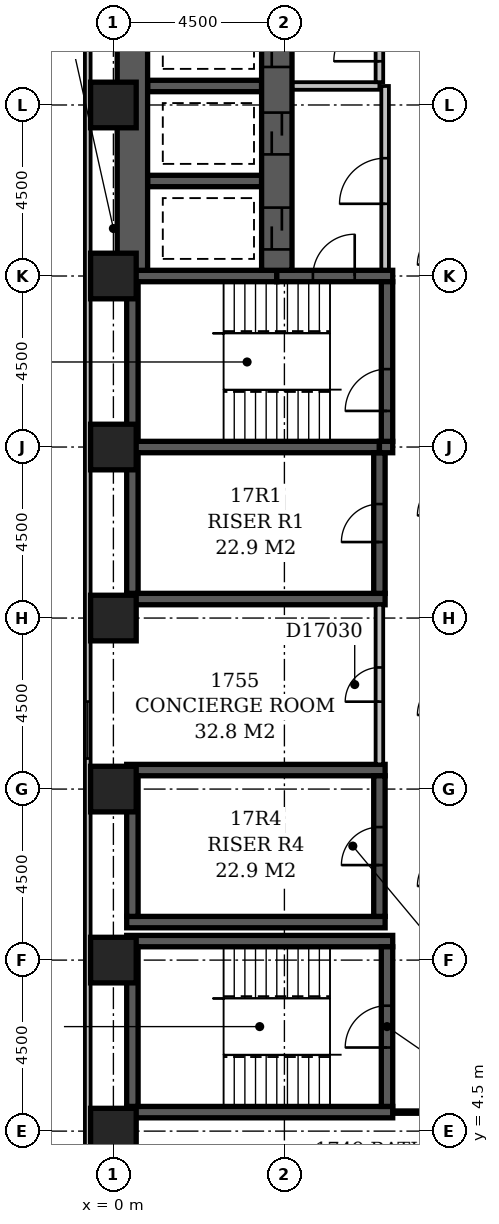
"""IFC4 building model, lengths in metres.
Left out: names, types, materials, properties, quantities, classifications, styles, units other than length and angle.
Written with IfcOpenShell. Run it as: python <this file> out.ifc"""

import sys

from ifc_helpers import new_model, si_unit, direction, frame, frame_2d, origin, origin_2d, place, context, subcontext, project, spatial, rectangle, extrude, element, fill, save


model = new_model("IFC4")
c1 = context("Model", 3, precision=1e-05, world=origin(), true_north=direction((0.0, 1.0)))
c2 = subcontext(c1, "Body", "Model", "MODEL_VIEW")
j1 = project(units=[si_unit("LENGTHUNIT", "METRE"), si_unit("PLANEANGLEUNIT", "RADIAN")], contexts=[c1])
p1 = place(None, origin())
s1 = spatial("IfcSite", under=j1, at=p1, CompositionType="ELEMENT")
p2 = place(p1, origin())
s2 = spatial("IfcBuilding", under=s1, at=p2, CompositionType="ELEMENT")
p3 = place(p2, frame((0.0, 0.0, 72.2)))
s3 = spatial("IfcBuildingStorey", under=s2, at=p3, CompositionType="ELEMENT", Elevation=72.2)
for number, where, z_axis, x_axis in (
    (1, (0.35, 5.0, -0.3), (0.0, 0.0, 1.0), (1.0, 0.0, 0.0)),
    (2, (0.35, 9.5, -0.3), (0.0, 0.0, 1.0), (1.0, 0.0, 0.0)),
):
    element("IfcWall", number, at=place(p3, frame(where, z_axis=z_axis, x_axis=x_axis)), inside=s3, PredefinedType="SHEAR", context=c2, shape_type="SweptSolid", body=[
        extrude(rectangle(XDim=7.0, YDim=0.3, at=frame_2d((3.5, 0.0))), origin(), (0.0, 0.0, 1.0), 3.6),
    ])
for number, where, z_axis, x_axis in (
    (3, (0.35, 10.0, -0.3), (0.0, 0.0, 1.0), (1.0, 0.0, 0.0)),
    (4, (0.35, 14.0, -0.3), (0.0, 0.0, 1.0), (1.0, 0.0, 0.0)),
    (5, (0.35, 18.5, -0.3), (0.0, 0.0, 1.0), (1.0, 0.0, 0.0)),
):
    element("IfcWall", number, at=place(p3, frame(where, z_axis=z_axis, x_axis=x_axis)), inside=s3, PredefinedType="SHEAR", context=c2, shape_type="SweptSolid", body=[
        extrude(rectangle(XDim=6.8, YDim=0.3, at=frame_2d((3.4, 0.0))), origin(), (0.0, 0.0, 1.0), 3.6),
    ])
p4 = place(p3, frame((0.35, 22.5, -0.3), z_axis=(0.0, 0.0, 1.0), x_axis=(1.0, 0.0, 0.0)))
e6 = element("IfcWall", 6, at=p4, inside=s3, PredefinedType="SHEAR", context=c2, shape_type="SweptSolid", body=[
    extrude(rectangle(XDim=6.65, YDim=0.3, at=frame_2d((3.325, 0.0))), origin(), (0.0, 0.0, 1.0), 3.6),
])
p5 = place(p3, frame((0.35, 27.0, -0.3), z_axis=(0.0, 0.0, 1.0), x_axis=(1.0, 0.0, 0.0)))
e7 = element("IfcWall", 7, at=p5, inside=s3, PredefinedType="SHEAR", context=c2, shape_type="SweptSolid", body=[
    extrude(rectangle(XDim=3.95, YDim=0.3, at=frame_2d((1.975, 0.0))), origin(), (0.0, 0.0, 1.0), 3.6),
])
p6 = place(p3, frame((0.5, 5.15, -0.3), z_axis=(0.0, 0.0, 1.0), x_axis=(0.0, 1.0, 0.0)))
e8 = element("IfcWall", 8, at=p6, inside=s3, PredefinedType="SHEAR", context=c2, shape_type="SweptSolid", body=[
    extrude(rectangle(XDim=4.2, YDim=0.3, at=frame_2d((2.1, 0.0))), origin(), (0.0, 0.0, 1.0), 3.6),
])
for number, where, z_axis, x_axis in (
    (9, (0.5, 10.15, -0.3), (0.0, 0.0, 1.0), (0.0, 1.0, 0.0)),
    (10, (0.5, 18.65, -0.3), (0.0, 0.0, 1.0), (0.0, 1.0, 0.0)),
):
    element("IfcWall", number, at=place(p3, frame(where, z_axis=z_axis, x_axis=x_axis)), inside=s3, PredefinedType="SHEAR", context=c2, shape_type="SweptSolid", body=[
        extrude(rectangle(XDim=3.7, YDim=0.3, at=frame_2d((1.85, 0.0))), origin(), (0.0, 0.0, 1.0), 3.6),
    ])
p7 = place(p3, frame((0.5, 22.65, -0.3), z_axis=(0.0, 0.0, 1.0), x_axis=(0.0, 1.0, 0.0)))
e11 = element("IfcWall", 11, at=p7, inside=s3, PredefinedType="SHEAR", context=c2, shape_type="SweptSolid", body=[
    extrude(rectangle(XDim=4.2, YDim=0.3, at=frame_2d((2.1, 0.0))), origin(), (0.0, 0.0, 1.0), 3.6),
])
p8 = place(p3, frame((0.5, 27.15, -0.3), z_axis=(0.0, 0.0, 1.0), x_axis=(0.0, 1.0, 0.0)))
e12 = element("IfcWall", 12, at=p8, inside=s3, PredefinedType="SHEAR", context=c2, shape_type="SweptSolid", body=[
    extrude(rectangle(XDim=6.95, YDim=0.8, at=frame_2d((3.475, 0.0))), origin(), (0.0, 0.0, 1.0), 3.6),
])
for number, where, z_axis, x_axis in (
    (13, (0.9, 29.5, -0.3), (0.0, 0.0, 1.0), (1.0, 0.0, 0.0)),
    (14, (0.9, 32.0, -0.3), (0.0, 0.0, 1.0), (1.0, 0.0, 0.0)),
):
    element("IfcWall", number, at=place(p3, frame(where, z_axis=z_axis, x_axis=x_axis)), inside=s3, PredefinedType="SHEAR", context=c2, shape_type="SweptSolid", body=[
        extrude(rectangle(XDim=3.0, YDim=0.3, at=frame_2d((1.5, 0.0))), origin(), (0.0, 0.0, 1.0), 3.6),
    ])
p9 = place(p3, frame((4.3, 27.0, -0.3), z_axis=(0.0, 0.0, 1.0), x_axis=(1.0, 0.0, 0.0)))
e15 = element("IfcWall", 15, at=p9, inside=s3, PredefinedType="SHEAR", context=c2, shape_type="SweptSolid", body=[
    extrude(rectangle(XDim=3.05, YDim=0.3, at=frame_2d((1.525, 0.0))), origin(), (0.0, 0.0, 1.0), 3.6),
])
p10 = place(p9, frame((0.95, 0.0, 0.3)))
e16 = element("IfcOpeningElement", 16, at=p10, cuts=e15, PredefinedType="OPENING", context=c2, shape_type="SweptSolid", body=[
    extrude(rectangle(XDim=1.1, YDim=2.1, at=frame_2d((0.55, 1.05))), frame((0.0, 0.162, 0.0), z_axis=(0.0, -1.0, 0.0), x_axis=(1.0, 0.0, 0.0)), (0.0, 0.0, 1.0), 0.324),
])
p11 = place(p3, frame((4.3, 27.15, -0.3), z_axis=(0.0, 0.0, 1.0), x_axis=(0.0, 1.0, 0.0)))
e17 = element("IfcWall", 17, at=p11, inside=s3, PredefinedType="SHEAR", context=c2, shape_type="SweptSolid", body=[
    extrude(rectangle(XDim=6.95, YDim=0.8, at=frame_2d((3.475, 0.0))), origin(), (0.0, 0.0, 1.0), 3.6),
])
p12 = place(p11, frame((3.05, 0.0, 0.3)))
e18 = element("IfcOpeningElement", 18, at=p12, cuts=e17, PredefinedType="OPENING", context=c2, shape_type="SweptSolid", body=[
    extrude(rectangle(XDim=1.1, YDim=2.1, at=frame_2d((0.55, 1.05))), frame((0.0, 0.412, 0.0), z_axis=(0.0, -1.0, 0.0), x_axis=(1.0, 0.0, 0.0)), (0.0, 0.0, 1.0), 0.824),
])
p13 = place(p11, frame((0.55, 0.0, 0.3)))
e19 = element("IfcOpeningElement", 19, at=p13, cuts=e17, PredefinedType="OPENING", context=c2, shape_type="SweptSolid", body=[
    extrude(rectangle(XDim=1.1, YDim=2.1, at=frame_2d((0.55, 1.05))), frame((0.0, 0.412, 0.0), z_axis=(0.0, -1.0, 0.0), x_axis=(1.0, 0.0, 0.0)), (0.0, 0.0, 1.0), 0.824),
])
p14 = place(p11, frame((5.35, 0.0, 0.3)))
e20 = element("IfcOpeningElement", 20, at=p14, cuts=e17, PredefinedType="OPENING", context=c2, shape_type="SweptSolid", body=[
    extrude(rectangle(XDim=1.1, YDim=2.1, at=frame_2d((0.55, 1.05))), frame((0.0, 0.412, 0.0), z_axis=(0.0, -1.0, 0.0), x_axis=(1.0, 0.0, 0.0)), (0.0, 0.0, 1.0), 0.824),
])
p15 = place(p3, frame((7.0, 10.15, -0.3), z_axis=(0.0, 0.0, 1.0), x_axis=(0.0, 1.0, 0.0)))
e21 = element("IfcWall", 21, at=p15, inside=s3, PredefinedType="SHEAR", context=c2, shape_type="SweptSolid", body=[
    extrude(rectangle(XDim=3.7, YDim=0.3, at=frame_2d((1.85, 0.0))), origin(), (0.0, 0.0, 1.0), 3.6),
])
p16 = place(p15, frame((1.35, 0.0, 0.3)))
e22 = element("IfcOpeningElement", 22, at=p16, cuts=e21, PredefinedType="OPENING", context=c2, shape_type="SweptSolid", body=[
    extrude(rectangle(XDim=1.0, YDim=2.1, at=frame_2d((0.5, 1.05))), frame((0.0, 0.162, 0.0), z_axis=(0.0, -1.0, 0.0), x_axis=(1.0, 0.0, 0.0)), (0.0, 0.0, 1.0), 0.324),
])
p17 = place(p3, frame((7.0, 18.65, -0.3), z_axis=(0.0, 0.0, 1.0), x_axis=(0.0, 1.0, 0.0)))
e23 = element("IfcWall", 23, at=p17, inside=s3, PredefinedType="SHEAR", context=c2, shape_type="SweptSolid", body=[
    extrude(rectangle(XDim=3.7, YDim=0.3, at=frame_2d((1.85, 0.0))), origin(), (0.0, 0.0, 1.0), 3.6),
])
p18 = place(p17, frame((1.35, 0.0, 0.3)))
e24 = element("IfcOpeningElement", 24, at=p18, cuts=e23, PredefinedType="OPENING", context=c2, shape_type="SweptSolid", body=[
    extrude(rectangle(XDim=1.0, YDim=2.1, at=frame_2d((0.5, 1.05))), frame((0.0, 0.162, 0.0), z_axis=(0.0, -1.0, 0.0), x_axis=(1.0, 0.0, 0.0)), (0.0, 0.0, 1.0), 0.324),
])
p19 = place(p3, frame((7.0, 22.5, -0.3), z_axis=(0.0, 0.0, 1.0), x_axis=(1.0, 0.0, 0.0)))
e25 = element("IfcWall", 25, at=p19, inside=s3, PredefinedType="SHEAR", context=c2, shape_type="SweptSolid", body=[
    extrude(rectangle(XDim=0.35, YDim=0.3, at=frame_2d((0.175, 0.0))), origin(), (0.0, 0.0, 1.0), 3.6),
])
p20 = place(p3, frame((7.2, 5.15, -0.3), z_axis=(0.0, 0.0, 1.0), x_axis=(0.0, 1.0, 0.0)))
e26 = element("IfcWall", 26, at=p20, inside=s3, PredefinedType="SHEAR", context=c2, shape_type="SweptSolid", body=[
    extrude(rectangle(XDim=4.2, YDim=0.3, at=frame_2d((2.1, 0.0))), origin(), (0.0, 0.0, 1.0), 3.6),
])
p21 = place(p20, frame((1.55, 0.0, 0.3)))
e27 = element("IfcOpeningElement", 27, at=p21, cuts=e26, PredefinedType="OPENING", context=c2, shape_type="SweptSolid", body=[
    extrude(rectangle(XDim=1.1, YDim=2.1, at=frame_2d((0.55, 1.05))), frame((0.0, 0.162, 0.0), z_axis=(0.0, -1.0, 0.0), x_axis=(1.0, 0.0, 0.0)), (0.0, 0.0, 1.0), 0.324),
])
p22 = place(p3, frame((7.2, 22.65, -0.3), z_axis=(0.0, 0.0, 1.0), x_axis=(0.0, 1.0, 0.0)))
e28 = element("IfcWall", 28, at=p22, inside=s3, PredefinedType="SHEAR", context=c2, shape_type="SweptSolid", body=[
    extrude(rectangle(XDim=4.2, YDim=0.3, at=frame_2d((2.1, 0.0))), origin(), (0.0, 0.0, 1.0), 3.6),
])
p23 = place(p22, frame((0.8, 0.0, 0.3)))
e29 = element("IfcOpeningElement", 29, at=p23, cuts=e28, PredefinedType="OPENING", context=c2, shape_type="SweptSolid", body=[
    extrude(rectangle(XDim=1.1, YDim=2.1, at=frame_2d((0.55, 1.05))), frame((0.0, 0.162, 0.0), z_axis=(0.0, -1.0, 0.0), x_axis=(1.0, 0.0, 0.0)), (0.0, 0.0, 1.0), 0.324),
])
for number, where, z_axis, x_axis in (
    (30, (0.0, 4.5, -0.3), (0.0, 0.0, 1.0), (1.0, 0.0, 0.0)),
    (31, (0.0, 9.0, -0.3), (0.0, 0.0, 1.0), (1.0, 0.0, 0.0)),
    (32, (0.0, 13.5, -0.3), (0.0, 0.0, 1.0), (1.0, 0.0, 0.0)),
    (33, (0.0, 18.0, -0.3), (0.0, 0.0, 1.0), (1.0, 0.0, 0.0)),
    (34, (0.0, 22.5, -0.3), (0.0, 0.0, 1.0), (1.0, 0.0, 0.0)),
    (35, (0.0, 27.0, -0.3), (0.0, 0.0, 1.0), (1.0, 0.0, 0.0)),
    (36, (0.0, 31.5, -0.3), (0.0, 0.0, 1.0), (1.0, 0.0, 0.0)),
):
    element("IfcColumn", number, at=place(p3, frame(where, z_axis=z_axis, x_axis=x_axis)), inside=s3, PredefinedType="COLUMN", context=c2, shape_type="SweptSolid", body=[
        extrude(rectangle(XDim=1.2, YDim=1.2, at=origin_2d()), origin(), (0.0, 0.0, 1.0), 3.6),
    ])
p24 = place(p3, frame((-0.675, 59.1, 0.0), z_axis=(0.0, 0.0, 1.0), x_axis=(0.0, -1.0, 0.0)))
e37 = element("IfcWall", 37, at=p24, inside=s3, PredefinedType="STANDARD", context=c2, shape_type="SweptSolid", body=[
    extrude(rectangle(XDim=55.35, YDim=0.15, at=frame_2d((27.675, 0.0))), origin(), (0.0, 0.0, 1.0), 2.7),
])
p25 = place(p24, frame((16.297, 0.0, 0.6)))
e38 = element("IfcOpeningElement", 38, at=p25, cuts=e37, PredefinedType="OPENING", context=c2, shape_type="SweptSolid", body=[
    extrude(rectangle(XDim=1.5, YDim=1.8, at=frame_2d((0.75, 0.9))), frame((0.0, 0.087, 0.0), z_axis=(0.0, -1.0, 0.0), x_axis=(1.0, 0.0, 0.0)), (0.0, 0.0, 1.0), 0.174),
])
p26 = place(p24, frame((19.65, 0.0, 0.6)))
e39 = element("IfcOpeningElement", 39, at=p26, cuts=e37, PredefinedType="OPENING", context=c2, shape_type="SweptSolid", body=[
    extrude(rectangle(XDim=2.4, YDim=1.8, at=frame_2d((1.2, 0.9))), frame((0.0, 0.087, 0.0), z_axis=(0.0, -1.0, 0.0), x_axis=(1.0, 0.0, 0.0)), (0.0, 0.0, 1.0), 0.174),
])
p27 = place(p24, frame((43.297, 0.0, 0.6)))
e40 = element("IfcOpeningElement", 40, at=p27, cuts=e37, PredefinedType="OPENING", context=c2, shape_type="SweptSolid", body=[
    extrude(rectangle(XDim=1.5, YDim=1.8, at=frame_2d((0.75, 0.9))), frame((0.0, 0.087, 0.0), z_axis=(0.0, -1.0, 0.0), x_axis=(1.0, 0.0, 0.0)), (0.0, 0.0, 1.0), 0.174),
])
p28 = place(p3, frame((4.72, 32.0, 0.0), z_axis=(0.0, 0.0, 1.0), x_axis=(1.0, 0.0, 0.0)))
e41 = element("IfcWall", 41, at=p28, inside=s3, PredefinedType="PARTITIONING", context=c2, shape_type="SweptSolid", body=[
    extrude(rectangle(XDim=2.28, YDim=0.2, at=frame_2d((1.14, 0.0))), origin(), (0.0, 0.0, 1.0), 3.3),
])
p29 = place(p3, frame((7.0, 32.1, 0.0), z_axis=(0.0, 0.0, 1.0), x_axis=(0.0, 1.0, 0.0)))
e42 = element("IfcWall", 42, at=p29, inside=s3, PredefinedType="PARTITIONING", context=c2, shape_type="SweptSolid", body=[
    extrude(rectangle(XDim=2.4, YDim=0.2, at=frame_2d((1.2, 0.0))), origin(), (0.0, 0.0, 1.0), 3.3),
])
p30 = place(p29, frame((0.55, 0.0, 0.0)))
e43 = element("IfcOpeningElement", 43, at=p30, cuts=e42, PredefinedType="OPENING", context=c2, shape_type="SweptSolid", body=[
    extrude(rectangle(XDim=1.2, YDim=2.1, at=frame_2d((0.6, 1.05))), frame((0.0, 0.112, 0.0), z_axis=(0.0, -1.0, 0.0), x_axis=(1.0, 0.0, 0.0)), (0.0, 0.0, 1.0), 0.224),
])
p31 = place(p3, frame((7.15, 27.17, 0.0), z_axis=(0.0, 0.0, 1.0), x_axis=(0.0, 1.0, 0.0)))
e44 = element("IfcWall", 44, at=p31, inside=s3, PredefinedType="PARTITIONING", context=c2, shape_type="SweptSolid", body=[
    extrude(rectangle(XDim=4.83, YDim=0.2, at=frame_2d((2.415, 0.0))), origin(), (0.0, 0.0, 1.0), 3.3),
])
p32 = place(p31, frame((1.73, 0.0, 0.0)))
e45 = element("IfcOpeningElement", 45, at=p32, cuts=e44, PredefinedType="OPENING", context=c2, shape_type="SweptSolid", body=[
    extrude(rectangle(XDim=1.2, YDim=2.1, at=frame_2d((0.6, 1.05))), frame((0.0, 0.112, 0.0), z_axis=(0.0, -1.0, 0.0), x_axis=(1.0, 0.0, 0.0)), (0.0, 0.0, 1.0), 0.224),
])
p33 = place(p3, frame((0.0, 4.4, 0.0), z_axis=(0.0, 0.0, 1.0), x_axis=(0.0, 1.0, 0.0)))
e46 = element("IfcWall", 46, at=p33, inside=s3, PredefinedType="PARTITIONING", context=c2, shape_type="SweptSolid", body=[
    extrude(rectangle(XDim=0.7, YDim=0.1, at=frame_2d((0.35, 0.0))), origin(), (0.0, 0.0, 1.0), 2.7),
])
p34 = place(p3, frame((7.349, 5.0, 0.0), z_axis=(0.0, 0.0, 1.0), x_axis=(1.0, 0.0, 0.0)))
e47 = element("IfcWall", 47, at=p34, inside=s3, PredefinedType="PARTITIONING", context=c2, shape_type="SweptSolid", body=[
    extrude(rectangle(XDim=1.551, YDim=0.1, at=frame_2d((0.775, 0.0))), origin(), (0.0, 0.0, 1.0), 3.3),
])
p35 = place(p3, frame((7.0, 14.15, 0.0), z_axis=(0.0, 0.0, 1.0), x_axis=(0.0, 1.0, 0.0)))
e48 = element("IfcWall", 48, at=p35, inside=s3, PredefinedType="PARTITIONING", context=c2, shape_type="SweptSolid", body=[
    extrude(rectangle(XDim=4.2, YDim=0.2, at=frame_2d((2.1, 0.0))), origin(), (0.0, 0.0, 1.0), 3.3),
])
p36 = place(p35, frame((1.65, 0.0, 0.0)))
e49 = element("IfcOpeningElement", 49, at=p36, cuts=e48, PredefinedType="OPENING", context=c2, shape_type="SweptSolid", body=[
    extrude(rectangle(XDim=0.9, YDim=2.1, at=frame_2d((0.45, 1.05))), frame((0.0, 0.112, 0.0), z_axis=(0.0, -1.0, 0.0), x_axis=(1.0, 0.0, 0.0)), (0.0, 0.0, 1.0), 0.224),
])
p37 = place(p27, origin())
e50 = element("IfcWindow", 50, at=p37, inside=s3, PartitioningType="SINGLE_PANEL", PredefinedType="WINDOW", context=c2, shape_type="SweptSolid", body=[
    extrude(rectangle(XDim=1.5, YDim=1.8, at=frame_2d((0.75, 0.9))), frame((0.0, 0.03, 0.0), z_axis=(0.0, -1.0, 0.0), x_axis=(1.0, 0.0, 0.0)), (0.0, 0.0, 1.0), 0.06),
])
fill(e40, e50)
p38 = place(p32, origin())
e51 = element("IfcDoor", 51, at=p38, inside=s3, OperationType="SINGLE_SWING_LEFT", PredefinedType="DOOR", context=c2, shape_type="SweptSolid", body=[
    extrude(rectangle(XDim=1.2, YDim=2.1, at=frame_2d((0.6, 1.05))), frame((0.0, 0.025, 0.0), z_axis=(0.0, -1.0, 0.0), x_axis=(1.0, 0.0, 0.0)), (0.0, 0.0, 1.0), 0.05),
])
fill(e45, e51)
p39 = place(p12, origin())
e52 = element("IfcDoor", 52, at=p39, inside=s3, OperationType="SLIDING_TO_LEFT", PredefinedType="DOOR", context=c2, shape_type="SweptSolid", body=[
    extrude(rectangle(XDim=1.1, YDim=2.1, at=frame_2d((0.55, 1.05))), frame((0.0, 0.025, 0.0), z_axis=(0.0, -1.0, 0.0), x_axis=(1.0, 0.0, 0.0)), (0.0, 0.0, 1.0), 0.05),
])
fill(e18, e52)
p40 = place(p13, origin())
e53 = element("IfcDoor", 53, at=p40, inside=s3, OperationType="SLIDING_TO_LEFT", PredefinedType="DOOR", context=c2, shape_type="SweptSolid", body=[
    extrude(rectangle(XDim=1.1, YDim=2.1, at=frame_2d((0.55, 1.05))), frame((0.0, 0.025, 0.0), z_axis=(0.0, -1.0, 0.0), x_axis=(1.0, 0.0, 0.0)), (0.0, 0.0, 1.0), 0.05),
])
fill(e19, e53)
p41 = place(p30, origin())
e54 = element("IfcDoor", 54, at=p41, inside=s3, OperationType="SINGLE_SWING_LEFT", PredefinedType="DOOR", context=c2, shape_type="SweptSolid", body=[
    extrude(rectangle(XDim=1.2, YDim=2.1, at=frame_2d((0.6, 1.05))), frame((0.0, 0.025, 0.0), z_axis=(0.0, -1.0, 0.0), x_axis=(1.0, 0.0, 0.0)), (0.0, 0.0, 1.0), 0.05),
])
fill(e43, e54)
p42 = place(p14, origin())
e55 = element("IfcDoor", 55, at=p42, inside=s3, OperationType="SLIDING_TO_LEFT", PredefinedType="DOOR", context=c2, shape_type="SweptSolid", body=[
    extrude(rectangle(XDim=1.1, YDim=2.1, at=frame_2d((0.55, 1.05))), frame((0.0, 0.025, 0.0), z_axis=(0.0, -1.0, 0.0), x_axis=(1.0, 0.0, 0.0)), (0.0, 0.0, 1.0), 0.05),
])
fill(e20, e55)
p43 = place(p18, origin())
e56 = element("IfcDoor", 56, at=p43, inside=s3, OperationType="SINGLE_SWING_LEFT", PredefinedType="DOOR", context=c2, shape_type="SweptSolid", body=[
    extrude(rectangle(XDim=1.0, YDim=2.1, at=frame_2d((0.5, 1.05))), frame((0.0, 0.025, 0.0), z_axis=(0.0, -1.0, 0.0), x_axis=(1.0, 0.0, 0.0)), (0.0, 0.0, 1.0), 0.05),
])
fill(e24, e56)
p44 = place(p16, origin())
e57 = element("IfcDoor", 57, at=p44, inside=s3, OperationType="SINGLE_SWING_LEFT", PredefinedType="DOOR", context=c2, shape_type="SweptSolid", body=[
    extrude(rectangle(XDim=1.0, YDim=2.1, at=frame_2d((0.5, 1.05))), frame((0.0, 0.025, 0.0), z_axis=(0.0, -1.0, 0.0), x_axis=(1.0, 0.0, 0.0)), (0.0, 0.0, 1.0), 0.05),
])
fill(e22, e57)
p45 = place(p10, frame((1.1, 0.0, 0.0), z_axis=(0.0, 0.0, 1.0), x_axis=(-1.0, 0.0, 0.0)))
e58 = element("IfcDoor", 58, at=p45, inside=s3, OperationType="SINGLE_SWING_LEFT", PredefinedType="DOOR", context=c2, shape_type="SweptSolid", body=[
    extrude(rectangle(XDim=1.1, YDim=2.1, at=frame_2d((0.55, 1.05))), frame((0.0, 0.025, 0.0), z_axis=(0.0, -1.0, 0.0), x_axis=(1.0, 0.0, 0.0)), (0.0, 0.0, 1.0), 0.05),
])
fill(e16, e58)
p46 = place(p23, origin())
e59 = element("IfcDoor", 59, at=p46, inside=s3, OperationType="SINGLE_SWING_LEFT", PredefinedType="DOOR", context=c2, shape_type="SweptSolid", body=[
    extrude(rectangle(XDim=1.1, YDim=2.1, at=frame_2d((0.55, 1.05))), frame((0.0, 0.025, 0.0), z_axis=(0.0, -1.0, 0.0), x_axis=(1.0, 0.0, 0.0)), (0.0, 0.0, 1.0), 0.05),
])
fill(e29, e59)
p47 = place(p21, origin())
e60 = element("IfcDoor", 60, at=p47, inside=s3, OperationType="SINGLE_SWING_LEFT", PredefinedType="DOOR", context=c2, shape_type="SweptSolid", body=[
    extrude(rectangle(XDim=1.1, YDim=2.1, at=frame_2d((0.55, 1.05))), frame((0.0, 0.025, 0.0), z_axis=(0.0, -1.0, 0.0), x_axis=(1.0, 0.0, 0.0)), (0.0, 0.0, 1.0), 0.05),
])
fill(e27, e60)
p48 = place(p36, origin())
e61 = element("IfcDoor", 61, at=p48, inside=s3, OperationType="SINGLE_SWING_LEFT", PredefinedType="DOOR", context=c2, shape_type="SweptSolid", body=[
    extrude(rectangle(XDim=0.9, YDim=2.1, at=frame_2d((0.45, 1.05))), frame((0.0, 0.025, 0.0), z_axis=(0.0, -1.0, 0.0), x_axis=(1.0, 0.0, 0.0)), (0.0, 0.0, 1.0), 0.05),
])
fill(e49, e61)
save(model, sys.argv[1])
